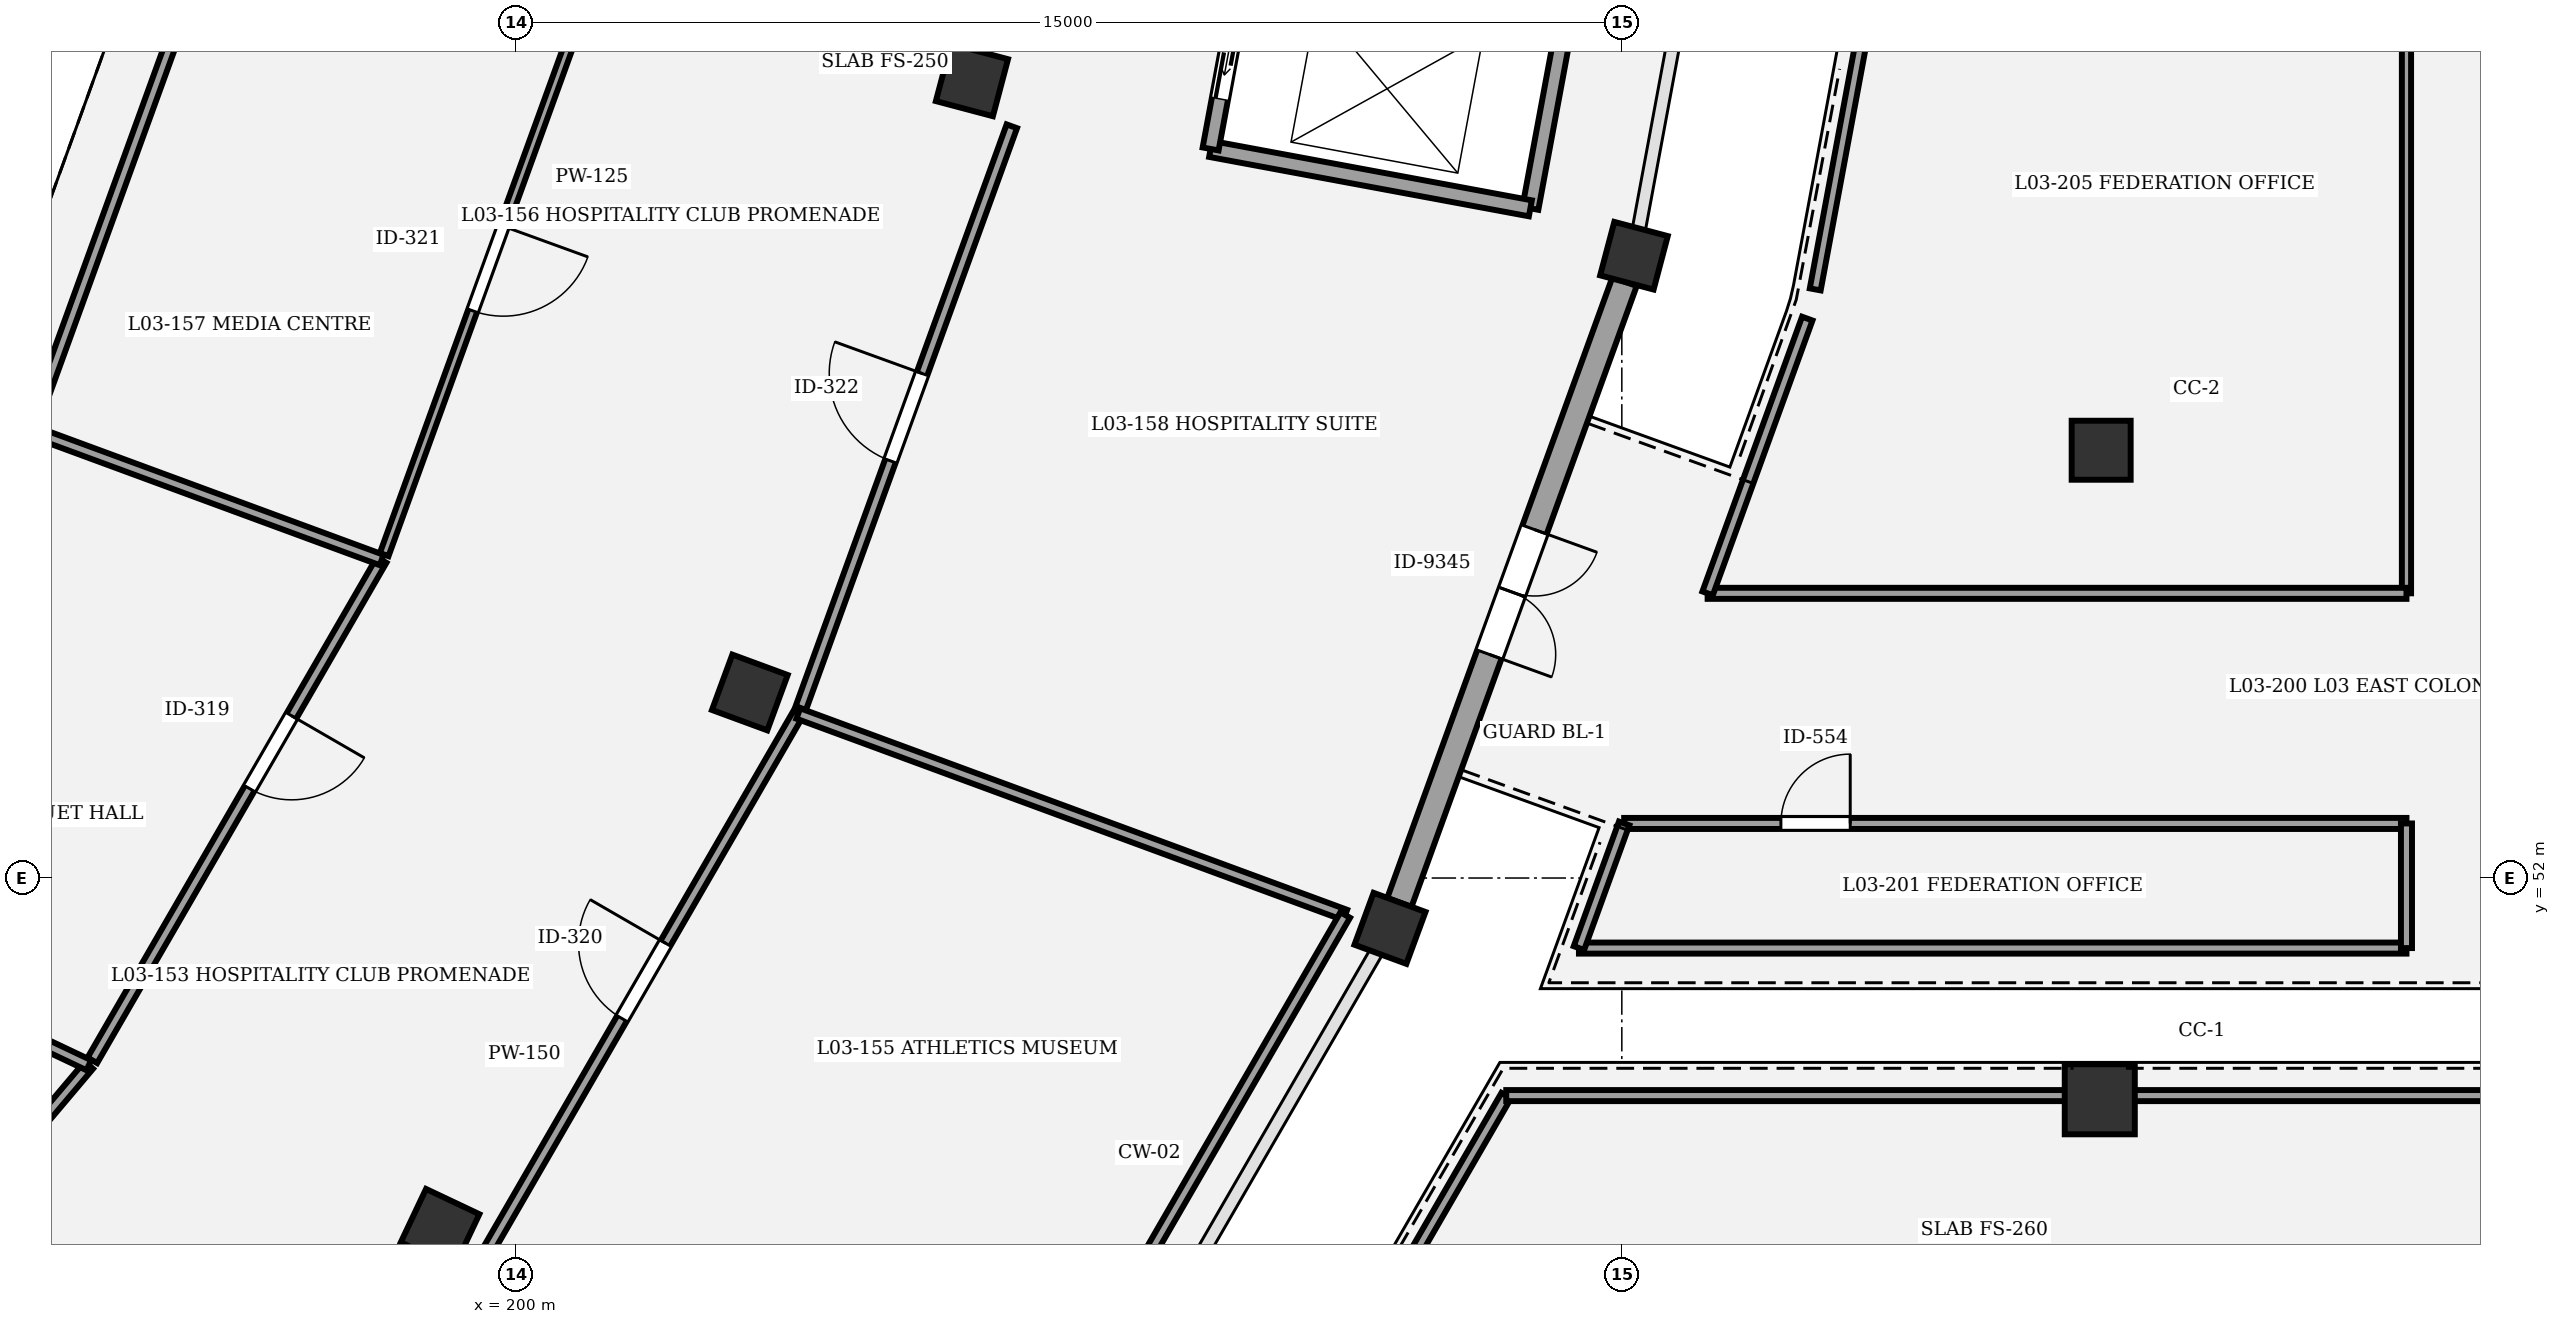
"""IFC4 building model, lengths in metres.
Left out: names, types, materials, properties, quantities, classifications, styles, units other than length and angle.
Written with IfcOpenShell. Run it as: python <this file> out.ifc"""

import sys

from ifc_helpers import new_model, si_unit, direction, frame, frame_2d, origin, origin_2d, place, context, subcontext, project, spatial, rectangle, circle, extrude, element, fill, save


model = new_model("IFC4")
c1 = context("Model", 3, precision=1e-05, world=origin(), true_north=direction((0.0, 1.0)))
c2 = subcontext(c1, "Body", "Model", "MODEL_VIEW")
j1 = project(units=[si_unit("LENGTHUNIT", "METRE"), si_unit("PLANEANGLEUNIT", "RADIAN")], contexts=[c1])
p1 = place(None, origin())
s1 = spatial("IfcSite", under=j1, at=p1, CompositionType="ELEMENT")
p2 = place(p1, origin())
s2 = spatial("IfcBuilding", under=s1, at=p2, CompositionType="ELEMENT")
p3 = place(p2, frame((0.0, 0.0, 14.7)))
s3 = spatial("IfcBuildingStorey", under=s2, at=p3, CompositionType="ELEMENT", Elevation=14.7)
for number, where, z_axis, x_axis in (
    (1, (198.976, 47.252, 0.0), (0.0, 0.0, 1.0), (0.904, -0.428, 0.0)),
    (2, (203.176, 54.516, 0.0), (0.0, 0.0, 1.0), (0.938, -0.346, 0.0)),
):
    element("IfcColumn", number, at=place(p3, frame(where, z_axis=z_axis, x_axis=x_axis)), inside=s3, PredefinedType="COLUMN", context=c2, shape_type="SweptSolid", body=[
        extrude(rectangle(XDim=0.8, YDim=0.8, at=origin_2d()), origin(), (0.0, 0.0, 1.0), 4.5),
    ])
p4 = place(p3, frame((211.856, 51.318, 0.0), z_axis=(0.0, 0.0, 1.0), x_axis=(0.938372433776, -0.34562577382, 0.0)))
e3 = element("IfcColumn", 3, at=p4, inside=s3, PredefinedType="COLUMN", context=c2, shape_type="SweptSolid", body=[
    extrude(rectangle(XDim=0.75, YDim=0.75, at=origin_2d()), origin(), (0.0, 0.0, 1.0), 4.5),
])
p5 = place(p3, frame((206.188, 62.818, 0.0), z_axis=(0.0, 0.0, 1.0), x_axis=(0.966600102017, -0.256289373133, 0.0)))
e4 = element("IfcColumn", 4, at=p5, inside=s3, PredefinedType="COLUMN", context=c2, shape_type="SweptSolid", body=[
    extrude(rectangle(XDim=0.8, YDim=0.8, at=origin_2d()), origin(), (0.0, 0.0, 1.0), 4.5),
])
p6 = place(p3, frame((215.165, 60.438, 0.0), z_axis=(0.0, 0.0, 1.0), x_axis=(0.966600102017, -0.256289373133, 0.0)))
e5 = element("IfcColumn", 5, at=p6, inside=s3, PredefinedType="COLUMN", context=c2, shape_type="SweptSolid", body=[
    extrude(rectangle(XDim=0.75, YDim=0.75, at=origin_2d()), origin(), (0.0, 0.0, 1.0), 4.5),
])
p7 = place(p3, frame((221.481, 49.0, 0.0), z_axis=(0.0, 0.0, 1.0), x_axis=(1.0, 0.0, 0.0)))
e6 = element("IfcColumn", 6, at=p7, inside=s3, PredefinedType="COLUMN", context=c2, shape_type="SweptSolid", body=[
    extrude(circle(Radius=0.475, at=origin_2d()), origin(), (0.0, 0.0, 1.0), 4.5),
])
p8 = place(p3, frame((221.5, 57.8, 0.0), z_axis=(0.0, 0.0, 1.0), x_axis=(1.0, 0.0, 0.0)))
e7 = element("IfcColumn", 7, at=p8, inside=s3, PredefinedType="COLUMN", context=c2, shape_type="SweptSolid", body=[
    extrude(circle(Radius=0.4, at=origin_2d()), origin(), (0.0, 0.0, 1.0), 4.5),
])
p9 = place(p3, frame((215.037, 60.087, 0.0), z_axis=(0.0, 0.0, 1.0), x_axis=(-0.341014063491, -0.94005819421, 0.0)))
e8 = element("IfcWall", 8, at=p9, inside=s3, PredefinedType="STANDARD", context=c2, shape_type="SweptSolid", body=[
    extrude(rectangle(XDim=8.956, YDim=0.35, at=frame_2d((4.478, 0.0))), origin(), (0.0, 0.0, 1.0), 3.42),
])
p10 = place(p9, frame((3.578, 0.0, 0.0)))
e9 = element("IfcOpeningElement", 9, at=p10, cuts=e8, PredefinedType="OPENING", context=c2, shape_type="SweptSolid", body=[
    extrude(rectangle(XDim=1.8, YDim=2.4, at=frame_2d((0.9, 1.2))), frame((0.0, 0.185, 0.0), z_axis=(0.0, -1.0, 0.0), x_axis=(1.0, 0.0, 0.0)), (0.0, 0.0, 1.0), 0.37),
])
p11 = place(p3, frame((215.772, 71.915, 0.0), z_axis=(0.0, 0.0, 1.0), x_axis=(-0.182574755222, -0.983191974517, 0.0)))
e10 = element("IfcWall", 10, at=p11, inside=s3, PredefinedType="SHEAR", context=c2, shape_type="SweptSolid", body=[
    extrude(rectangle(XDim=11.02, YDim=0.22, at=frame_2d((5.51, 0.0))), origin(), (0.0, 0.0, 1.0), 4.25),
])
p12 = place(p3, frame((209.424, 61.885, 0.0), z_axis=(0.0, 0.0, 1.0), x_axis=(0.983189729951, -0.18258684213, 0.0)))
e11 = element("IfcWall", 11, at=p12, inside=s3, PredefinedType="SHEAR", context=c2, shape_type="SweptSolid", body=[
    extrude(rectangle(XDim=4.41, YDim=0.22, at=frame_2d((2.205, 0.0))), origin(), (0.0, 0.0, 1.0), 4.25),
])
p13 = place(p3, frame((211.436, 72.72, 0.0), z_axis=(0.0, 0.0, 1.0), x_axis=(-0.182570778451, -0.983192712979, 0.0)))
e12 = element("IfcWall", 12, at=p13, inside=s3, PredefinedType="SHEAR", context=c2, shape_type="SweptSolid", body=[
    extrude(rectangle(XDim=11.02, YDim=0.22, at=frame_2d((5.51, 0.0))), origin(), (0.0, 0.0, 1.0), 4.25),
])
p14 = place(p13, frame((0.3, 0.0, 0.0)))
e13 = element("IfcOpeningElement", 13, at=p14, cuts=e12, PredefinedType="OPENING", context=c2, shape_type="SweptSolid", body=[
    extrude(rectangle(XDim=1.15, YDim=2.15, at=frame_2d((0.575, 1.075))), frame((0.0, 0.12, 0.0), z_axis=(0.0, -1.0, 0.0), x_axis=(1.0, 0.0, 0.0)), (0.0, 0.0, 1.0), 0.24),
])
p15 = place(p13, frame((9.23, 0.0, 0.0)))
e14 = element("IfcOpeningElement", 14, at=p15, cuts=e12, PredefinedType="OPENING", context=c2, shape_type="SweptSolid", body=[
    extrude(rectangle(XDim=1.1, YDim=2.15, at=frame_2d((0.55, 1.075))), frame((0.0, 0.12, 0.0), z_axis=(0.0, -1.0, 0.0), x_axis=(1.0, 0.0, 0.0)), (0.0, 0.0, 1.0), 0.24),
])
p16 = place(p3, frame((194.212, 49.462, 0.0), z_axis=(0.0, 0.0, 1.0), x_axis=(-0.645180817826, -0.764029915847, 0.0)))
e15 = element("IfcWall", 15, at=p16, inside=s3, PredefinedType="PARTITIONING", context=c2, shape_type="SweptSolid", body=[
    extrude(rectangle(XDim=7.779, YDim=0.15, at=frame_2d((3.89, 0.0))), origin(), (0.0, 0.0, 1.0), 3.25),
])
p17 = place(p16, frame((2.448, 0.0, 0.0)))
e16 = element("IfcOpeningElement", 16, at=p17, cuts=e15, PredefinedType="OPENING", context=c2, shape_type="SweptSolid", body=[
    extrude(rectangle(XDim=1.06, YDim=2.3, at=frame_2d((0.53, 1.15))), frame((0.0, 0.085, 0.0), z_axis=(0.0, -1.0, 0.0), x_axis=(1.0, 0.0, 0.0)), (0.0, 0.0, 1.0), 0.17),
])
p18 = place(p3, frame((198.183, 56.312, 0.0), z_axis=(0.0, 0.0, 1.0), x_axis=(-0.500584301803, -0.865687794063, 0.0)))
e17 = element("IfcWall", 17, at=p18, inside=s3, PredefinedType="PARTITIONING", context=c2, shape_type="SweptSolid", body=[
    extrude(rectangle(XDim=7.837, YDim=0.15, at=frame_2d((3.918, 0.0))), origin(), (0.0, 0.0, 1.0), 3.25),
])
p19 = place(p18, frame((2.44, 0.0, 0.0)))
e18 = element("IfcOpeningElement", 18, at=p19, cuts=e17, PredefinedType="OPENING", context=c2, shape_type="SweptSolid", body=[
    extrude(rectangle(XDim=1.14, YDim=2.3, at=frame_2d((0.57, 1.15))), frame((0.0, 0.085, 0.0), z_axis=(0.0, -1.0, 0.0), x_axis=(1.0, 0.0, 0.0)), (0.0, 0.0, 1.0), 0.17),
])
p20 = place(p3, frame((199.641, 46.981, 0.0), z_axis=(0.0, 0.0, 1.0), x_axis=(0.500559280672, 0.865702262059, 0.0)))
e19 = element("IfcWall", 19, at=p20, inside=s3, PredefinedType="PARTITIONING", context=c2, shape_type="SweptSolid", body=[
    extrude(rectangle(XDim=8.375, YDim=0.15, at=frame_2d((4.187, 0.0))), origin(), (0.0, 0.0, 1.0), 3.25),
])
p21 = place(p20, frame((3.597, 0.0, 0.0)))
e20 = element("IfcOpeningElement", 20, at=p21, cuts=e19, PredefinedType="OPENING", context=c2, shape_type="SweptSolid", body=[
    extrude(rectangle(XDim=1.18, YDim=2.3, at=frame_2d((0.59, 1.15))), frame((0.0, 0.085, 0.0), z_axis=(0.0, -1.0, 0.0), x_axis=(1.0, 0.0, 0.0)), (0.0, 0.0, 1.0), 0.17),
])
p22 = place(p3, frame((201.032, 64.144, 0.0), z_axis=(0.0, 0.0, 1.0), x_axis=(-0.341044733968, -0.940047067669, 0.0)))
e21 = element("IfcWall", 21, at=p22, inside=s3, PredefinedType="PARTITIONING", context=c2, shape_type="SweptSolid", body=[
    extrude(rectangle(XDim=8.254, YDim=0.125, at=frame_2d((4.127, 0.0))), origin(), (0.0, 0.0, 1.0), 3.25),
])
p23 = place(p22, frame((3.517, 0.0, 0.0)))
e22 = element("IfcOpeningElement", 22, at=p23, cuts=e21, PredefinedType="OPENING", context=c2, shape_type="SweptSolid", body=[
    extrude(rectangle(XDim=1.22, YDim=2.3, at=frame_2d((0.61, 1.15))), frame((0.0, 0.073, 0.0), z_axis=(0.0, -1.0, 0.0), x_axis=(1.0, 0.0, 0.0)), (0.0, 0.0, 1.0), 0.145),
])
p24 = place(p3, frame((203.866, 54.304, 0.0), z_axis=(0.0, 0.0, 1.0), x_axis=(0.341044550343, 0.940047134287, 0.0)))
e23 = element("IfcWall", 23, at=p24, inside=s3, PredefinedType="PARTITIONING", context=c2, shape_type="SweptSolid", body=[
    extrude(rectangle(XDim=8.392, YDim=0.15, at=frame_2d((4.196, 0.0))), origin(), (0.0, 0.0, 1.0), 3.25),
])
p25 = place(p24, frame((3.566, 0.0, 0.0)))
e24 = element("IfcOpeningElement", 24, at=p25, cuts=e23, PredefinedType="OPENING", context=c2, shape_type="SweptSolid", body=[
    extrude(rectangle(XDim=1.26, YDim=2.3, at=frame_2d((0.63, 1.15))), frame((0.0, 0.085, 0.0), z_axis=(0.0, -1.0, 0.0), x_axis=(1.0, 0.0, 0.0)), (0.0, 0.0, 1.0), 0.17),
])
p26 = place(p3, frame((215.031, 52.74, 0.0), z_axis=(0.0, 0.0, 1.0), x_axis=(1.0, 0.0, 0.0)))
e25 = element("IfcWall", 25, at=p26, inside=s3, PredefinedType="PARTITIONING", context=c2, shape_type="SweptSolid", body=[
    extrude(rectangle(XDim=10.608, YDim=0.15, at=frame_2d((5.304, 0.0))), origin(), (0.0, 0.0, 1.0), 3.25),
])
p27 = place(p26, frame((2.126, 0.0, 0.0)))
e26 = element("IfcOpeningElement", 26, at=p27, cuts=e25, PredefinedType="OPENING", context=c2, shape_type="SweptSolid", body=[
    extrude(rectangle(XDim=0.94, YDim=2.2, at=frame_2d((0.47, 1.1))), frame((0.0, 0.085, 0.0), z_axis=(0.0, -1.0, 0.0), x_axis=(1.0, 0.0, 0.0)), (0.0, 0.0, 1.0), 0.17),
])
p28 = place(p3, frame((225.64, 74.55, 0.0), z_axis=(0.0, 0.0, 1.0), x_axis=(0.0, -1.0, 0.0)))
e27 = element("IfcWall", 27, at=p28, inside=s3, PredefinedType="PARTITIONING", context=c2, shape_type="SweptSolid", body=[
    extrude(rectangle(XDim=18.69, YDim=0.125, at=frame_2d((9.345, 0.0))), origin(), (0.0, 0.0, 1.0), 3.25),
])
p29 = place(p28, frame((6.252, 0.0, 0.0)))
e28 = element("IfcOpeningElement", 28, at=p29, cuts=e27, PredefinedType="OPENING", context=c2, shape_type="SweptSolid", body=[
    extrude(rectangle(XDim=1.1, YDim=2.2, at=frame_2d((0.55, 1.1))), frame((0.0, 0.073, 0.0), z_axis=(0.0, -1.0, 0.0), x_axis=(1.0, 0.0, 0.0)), (0.0, 0.0, 1.0), 0.145),
])
p30 = place(p3, frame((189.675, 51.61, 0.0), z_axis=(0.0, 0.0, 1.0), x_axis=(0.90385861711, -0.427831275476, 0.0)))
e29 = element("IfcWall", 29, at=p30, inside=s3, PredefinedType="PARTITIONING", context=c2, shape_type="SweptSolid", body=[
    extrude(rectangle(XDim=5.02, YDim=0.15, at=frame_2d((2.51, 0.0))), origin(), (0.0, 0.0, 1.0), 3.25),
])
p31 = place(p3, frame((193.417, 58.068, 0.0), z_axis=(0.0, 0.0, 1.0), x_axis=(0.938343937369, -0.345703131607, 0.0)))
e30 = element("IfcWall", 30, at=p31, inside=s3, PredefinedType="PARTITIONING", context=c2, shape_type="SweptSolid", body=[
    extrude(rectangle(XDim=5.08, YDim=0.15, at=frame_2d((2.54, 0.0))), origin(), (0.0, 0.0, 1.0), 3.25),
])
p32 = place(p3, frame((203.833, 54.231, 0.0), z_axis=(0.0, 0.0, 1.0), x_axis=(0.938352081903, -0.34568102405, 0.0)))
e31 = element("IfcWall", 31, at=p32, inside=s3, PredefinedType="PARTITIONING", context=c2, shape_type="SweptSolid", body=[
    extrude(rectangle(XDim=7.904, YDim=0.15, at=frame_2d((3.952, 0.0))), origin(), (0.0, 0.0, 1.0), 3.25),
])
p33 = place(p3, frame((211.25, 51.499, 0.0), z_axis=(0.0, 0.0, 1.0), x_axis=(-0.500574107164, -0.865693689036, 0.0)))
e32 = element("IfcWall", 32, at=p33, inside=s3, PredefinedType="PARTITIONING", context=c2, shape_type="SweptSolid", body=[
    extrude(rectangle(XDim=9.08, YDim=0.15, at=frame_2d((4.54, 0.0))), origin(), (0.0, 0.0, 1.0), 3.25),
])
p34 = place(p3, frame((193.45, 58.141, 0.0), z_axis=(0.0, 0.0, 1.0), x_axis=(0.341049747433, 0.940045248792, 0.0)))
e33 = element("IfcWall", 33, at=p34, inside=s3, PredefinedType="PARTITIONING", context=c2, shape_type="SweptSolid", body=[
    extrude(rectangle(XDim=7.776, YDim=0.15, at=frame_2d((3.888, 0.0))), origin(), (0.0, 0.0, 1.0), 3.25),
])
p35 = place(p3, frame((209.407, 42.087, 0.0), z_axis=(0.0, 0.0, 1.0), x_axis=(0.500545605998, 0.865710168773, 0.0)))
e34 = element("IfcWall", 34, at=p35, inside=s3, PredefinedType="PARTITIONING", context=c2, shape_type="SweptSolid", body=[
    extrude(rectangle(XDim=8.043, YDim=0.15, at=frame_2d((4.021, 0.0))), origin(), (0.0, 0.0, 1.0), 3.25),
])
p36 = place(p3, frame((213.433, 49.05, 0.0), z_axis=(0.0, 0.0, 1.0), x_axis=(1.0, 0.0, 0.0)))
e35 = element("IfcWall", 35, at=p36, inside=s3, PredefinedType="PARTITIONING", context=c2, shape_type="SweptSolid", body=[
    extrude(rectangle(XDim=16.017, YDim=0.15, at=frame_2d((8.009, 0.0))), origin(), (0.0, 0.0, 1.0), 3.25),
])
p37 = place(p3, frame((225.64, 51.05, 0.0), z_axis=(0.0, 0.0, 1.0), x_axis=(-1.0, 0.0, 0.0)))
e36 = element("IfcWall", 36, at=p37, inside=s3, PredefinedType="PARTITIONING", context=c2, shape_type="SweptSolid", body=[
    extrude(rectangle(XDim=11.221, YDim=0.15, at=frame_2d((5.611, 0.0))), origin(), (0.0, 0.0, 1.0), 3.25),
])
p38 = place(p3, frame((214.418, 51.05, 0.0), z_axis=(0.0, 0.0, 1.0), x_axis=(0.341012375502, 0.940058806541, 0.0)))
e37 = element("IfcWall", 37, at=p38, inside=s3, PredefinedType="PARTITIONING", context=c2, shape_type="SweptSolid", body=[
    extrude(rectangle(XDim=1.798, YDim=0.15, at=frame_2d((0.899, 0.0))), origin(), (0.0, 0.0, 1.0), 3.25),
])
p39 = place(p3, frame((225.64, 52.74, 0.0), z_axis=(0.0, 0.0, 1.0), x_axis=(0.0, -1.0, 0.0)))
e38 = element("IfcWall", 38, at=p39, inside=s3, PredefinedType="PARTITIONING", context=c2, shape_type="SweptSolid", body=[
    extrude(rectangle(XDim=1.69, YDim=0.15, at=frame_2d((0.845, 0.0))), origin(), (0.0, 0.0, 1.0), 3.25),
])
p40 = place(p3, frame((217.623, 59.981, 0.0), z_axis=(0.0, 0.0, 1.0), x_axis=(0.182620957058, 0.983183393901, 0.0)))
e39 = element("IfcWall", 39, at=p40, inside=s3, PredefinedType="PARTITIONING", context=c2, shape_type="SweptSolid", body=[
    extrude(rectangle(XDim=10.901, YDim=0.15, at=frame_2d((5.45, 0.0))), origin(), (0.0, 0.0, 1.0), 3.25),
])
p41 = place(p3, frame((225.64, 55.86, 0.0), z_axis=(0.0, 0.0, 1.0), x_axis=(-1.0, 0.0, 0.0)))
e40 = element("IfcWall", 40, at=p41, inside=s3, PredefinedType="PARTITIONING", context=c2, shape_type="SweptSolid", body=[
    extrude(rectangle(XDim=9.477, YDim=0.15, at=frame_2d((4.738, 0.0))), origin(), (0.0, 0.0, 1.0), 3.25),
])
p42 = place(p3, frame((216.163, 55.86, 0.0), z_axis=(0.0, 0.0, 1.0), x_axis=(0.341035525383, 0.94005040845, 0.0)))
e41 = element("IfcWall", 41, at=p42, inside=s3, PredefinedType="PARTITIONING", context=c2, shape_type="SweptSolid", body=[
    extrude(rectangle(XDim=3.962, YDim=0.15, at=frame_2d((1.981, 0.0))), origin(), (0.0, 0.0, 1.0), 3.25),
])
p43 = place(p10, origin())
e42 = element("IfcDoor", 42, at=p43, inside=s3, OperationType="DOUBLE_DOOR_SINGLE_SWING", PredefinedType="DOOR", context=c2, shape_type="SweptSolid", body=[
    extrude(rectangle(XDim=1.8, YDim=2.4, at=frame_2d((0.9, 1.2))), frame((0.0, 0.025, 0.0), z_axis=(0.0, -1.0, 0.0), x_axis=(1.0, 0.0, 0.0)), (0.0, 0.0, 1.0), 0.05),
])
fill(e9, e42)
p44 = place(p15, origin())
e43 = element("IfcDoor", 43, at=p44, inside=s3, OperationType="DOUBLE_DOOR_SLIDING", PredefinedType="DOOR", context=c2, shape_type="SweptSolid", body=[
    extrude(rectangle(XDim=1.1, YDim=2.15, at=frame_2d((0.55, 1.075))), frame((0.0, 0.025, 0.0), z_axis=(0.0, -1.0, 0.0), x_axis=(1.0, 0.0, 0.0)), (0.0, 0.0, 1.0), 0.05),
])
fill(e14, e43)
p45 = place(p19, origin())
e44 = element("IfcDoor", 44, at=p45, inside=s3, OperationType="SINGLE_SWING_LEFT", PredefinedType="DOOR", context=c2, shape_type="SweptSolid", body=[
    extrude(rectangle(XDim=1.14, YDim=2.3, at=frame_2d((0.57, 1.15))), frame((0.0, 0.025, 0.0), z_axis=(0.0, -1.0, 0.0), x_axis=(1.0, 0.0, 0.0)), (0.0, 0.0, 1.0), 0.05),
])
fill(e18, e44)
p46 = place(p21, origin())
e45 = element("IfcDoor", 45, at=p46, inside=s3, OperationType="SINGLE_SWING_RIGHT", PredefinedType="DOOR", context=c2, shape_type="SweptSolid", body=[
    extrude(rectangle(XDim=1.18, YDim=2.3, at=frame_2d((0.59, 1.15))), frame((0.0, 0.025, 0.0), z_axis=(0.0, -1.0, 0.0), x_axis=(1.0, 0.0, 0.0)), (0.0, 0.0, 1.0), 0.05),
])
fill(e20, e45)
p47 = place(p23, origin())
e46 = element("IfcDoor", 46, at=p47, inside=s3, OperationType="SINGLE_SWING_LEFT", PredefinedType="DOOR", context=c2, shape_type="SweptSolid", body=[
    extrude(rectangle(XDim=1.22, YDim=2.3, at=frame_2d((0.61, 1.15))), frame((0.0, 0.025, 0.0), z_axis=(0.0, -1.0, 0.0), x_axis=(1.0, 0.0, 0.0)), (0.0, 0.0, 1.0), 0.05),
])
fill(e22, e46)
p48 = place(p25, origin())
e47 = element("IfcDoor", 47, at=p48, inside=s3, OperationType="SINGLE_SWING_RIGHT", PredefinedType="DOOR", context=c2, shape_type="SweptSolid", body=[
    extrude(rectangle(XDim=1.26, YDim=2.3, at=frame_2d((0.63, 1.15))), frame((0.0, 0.025, 0.0), z_axis=(0.0, -1.0, 0.0), x_axis=(1.0, 0.0, 0.0)), (0.0, 0.0, 1.0), 0.05),
])
fill(e24, e47)
p49 = place(p27, origin())
e48 = element("IfcDoor", 48, at=p49, inside=s3, OperationType="SINGLE_SWING_RIGHT", PredefinedType="DOOR", context=c2, shape_type="SweptSolid", body=[
    extrude(rectangle(XDim=0.94, YDim=2.2, at=frame_2d((0.47, 1.1))), frame((0.0, 0.025, 0.0), z_axis=(0.0, -1.0, 0.0), x_axis=(1.0, 0.0, 0.0)), (0.0, 0.0, 1.0), 0.05),
])
fill(e26, e48)
save(model, sys.argv[1])
